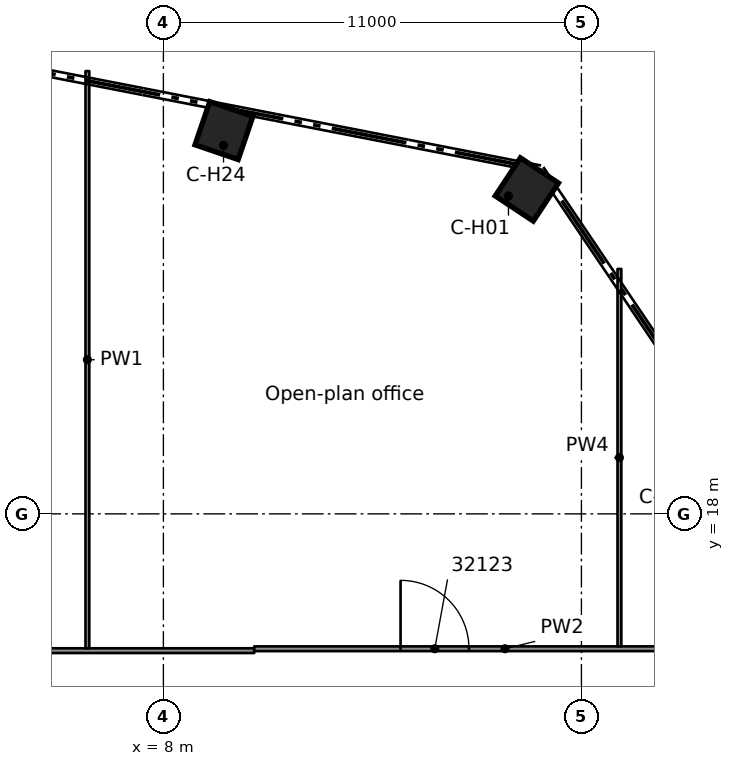
"""IFC4 building model, lengths in metres.
Left out: names, types, materials, properties, quantities, classifications, styles, units other than length and angle.
Written with IfcOpenShell. Run it as: python <this file> out.ifc"""

import sys

from ifc_helpers import new_model, si_unit, direction, frame, frame_2d, origin, origin_2d, place, context, subcontext, project, spatial, rectangle, extrude, element, fill, save


model = new_model("IFC4")
c1 = context("Model", 3, precision=1e-05, world=origin(), true_north=direction((0.0, 1.0)))
c2 = subcontext(c1, "Body", "Model", "MODEL_VIEW")
j1 = project(units=[si_unit("LENGTHUNIT", "METRE"), si_unit("PLANEANGLEUNIT", "RADIAN")], contexts=[c1])
p1 = place(None, origin())
s1 = spatial("IfcSite", under=j1, at=p1, CompositionType="ELEMENT")
p2 = place(p1, origin())
s2 = spatial("IfcBuilding", under=s1, at=p2, CompositionType="ELEMENT")
p3 = place(p2, frame((0.0, 0.0, 159.6)))
s3 = spatial("IfcBuildingStorey", under=s2, at=p3, CompositionType="ELEMENT", Elevation=159.6)
for number, where, z_axis, x_axis in (
    (1, (17.564, 26.536, 0.0), (0.0, 0.0, 1.0), (0.552, 0.834, 0.0)),
    (2, (9.594, 28.085, 0.0), (0.0, 0.0, 1.0), (0.323, 0.946, 0.0)),
):
    element("IfcColumn", number, at=place(p3, frame(where, z_axis=z_axis, x_axis=x_axis)), inside=s3, PredefinedType="COLUMN", context=c2, shape_type="SweptSolid", body=[
        extrude(rectangle(XDim=1.2, YDim=1.2, at=origin_2d()), origin(), (0.0, 0.0, 1.0), 3.5),
    ])
p4 = place(p3, frame((-10.39, 14.401, 0.0), z_axis=(0.0, 0.0, 1.0), x_axis=(1.0, 0.0, 0.0)))
e3 = element("IfcWall", 3, at=p4, inside=s3, PredefinedType="PARTITIONING", context=c2, shape_type="SweptSolid", body=[
    extrude(rectangle(XDim=20.781, YDim=0.125, at=frame_2d((10.391, 0.0))), origin(), (0.0, 0.0, 1.0), 3.08),
])
p5 = place(p4, frame((12.74, 0.0, 0.0)))
e4 = element("IfcOpeningElement", 4, at=p5, cuts=e3, PredefinedType="OPENING", context=c2, shape_type="SweptSolid", body=[
    extrude(rectangle(XDim=1.1, YDim=2.1, at=frame_2d((0.55, 1.05))), frame((0.0, 0.073, 0.0), z_axis=(0.0, -1.0, 0.0), x_axis=(1.0, 0.0, 0.0)), (0.0, 0.0, 1.0), 0.145),
])
p6 = place(p4, frame((6.74, 0.0, 0.0)))
e5 = element("IfcOpeningElement", 5, at=p6, cuts=e3, PredefinedType="OPENING", context=c2, shape_type="SweptSolid", body=[
    extrude(rectangle(XDim=1.1, YDim=2.1, at=frame_2d((0.55, 1.05))), frame((0.0, 0.073, 0.0), z_axis=(0.0, -1.0, 0.0), x_axis=(1.0, 0.0, 0.0)), (0.0, 0.0, 1.0), 0.145),
])
p7 = place(p3, frame((10.391, 14.451, 0.0), z_axis=(0.0, 0.0, 1.0), x_axis=(1.0, 0.0, 0.0)))
e6 = element("IfcWall", 6, at=p7, inside=s3, PredefinedType="PARTITIONING", context=c2, shape_type="SweptSolid", body=[
    extrude(rectangle(XDim=10.996, YDim=0.125, at=frame_2d((5.498, 0.0))), origin(), (0.0, 0.0, 1.0), 3.08),
])
p8 = place(p7, frame((3.85, 0.0, 0.0)))
e7 = element("IfcOpeningElement", 7, at=p8, cuts=e6, PredefinedType="OPENING", context=c2, shape_type="SweptSolid", body=[
    extrude(rectangle(XDim=1.8, YDim=2.1, at=frame_2d((0.9, 1.05))), frame((0.0, 0.073, 0.0), z_axis=(0.0, -1.0, 0.0), x_axis=(1.0, 0.0, 0.0)), (0.0, 0.0, 1.0), 0.145),
])
p9 = place(p3, frame((20.0, 14.514, 0.0), z_axis=(0.0, 0.0, 1.0), x_axis=(0.0, 1.0, 0.0)))
e8 = element("IfcWall", 8, at=p9, inside=s3, PredefinedType="PARTITIONING", context=c2, shape_type="SweptSolid", body=[
    extrude(rectangle(XDim=9.93, YDim=0.1, at=frame_2d((4.965, 0.0))), origin(), (0.0, 0.0, 1.0), 2.445),
])
p10 = place(p3, frame((6.0, 14.463, 0.0), z_axis=(0.0, 0.0, 1.0), x_axis=(0.0, 1.0, 0.0)))
e9 = element("IfcWall", 9, at=p10, inside=s3, PredefinedType="PARTITIONING", context=c2, shape_type="SweptSolid", body=[
    extrude(rectangle(XDim=15.187, YDim=0.1, at=frame_2d((7.594, 0.0))), origin(), (0.0, 0.0, 1.0), 3.08),
])
p11 = place(p8, origin())
e10 = element("IfcDoor", 10, at=p11, inside=s3, OperationType="DOUBLE_DOOR_SINGLE_SWING", PredefinedType="DOOR", context=c2, shape_type="SweptSolid", body=[
    extrude(rectangle(XDim=1.8, YDim=2.1, at=frame_2d((0.9, 1.05))), frame((0.0, 0.025, 0.0), z_axis=(0.0, -1.0, 0.0), x_axis=(1.0, 0.0, 0.0)), (0.0, 0.0, 1.0), 0.05),
])
fill(e7, e10)
save(model, sys.argv[1])
